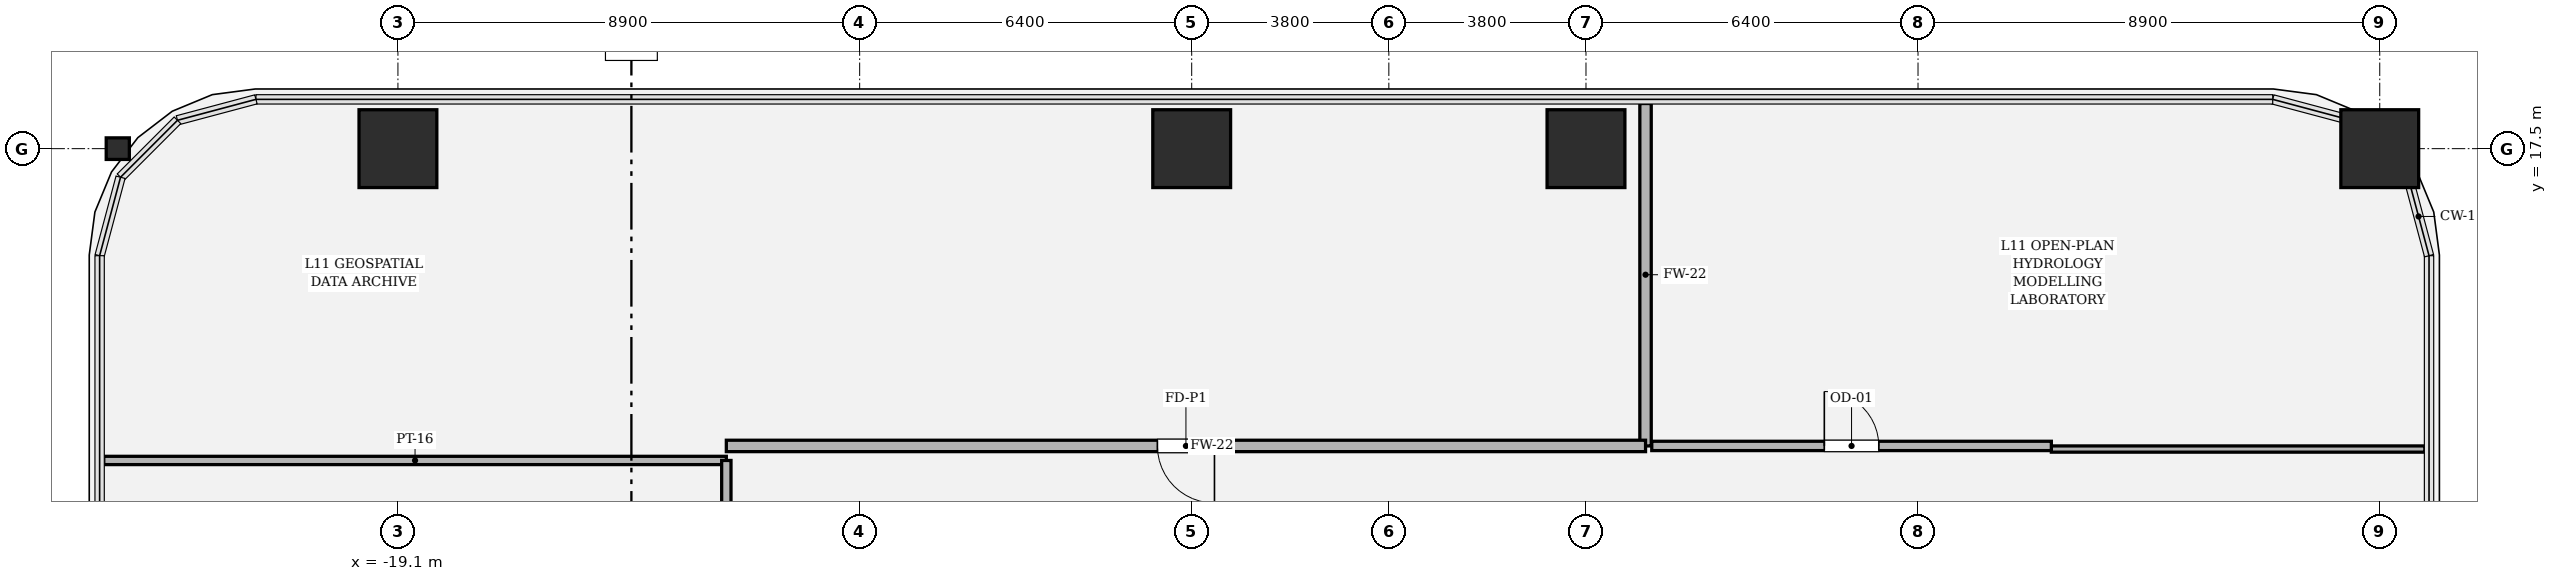
"""IFC4 building model, lengths in metres.
Left out: names, types, materials, properties, quantities, classifications, styles, units other than length and angle.
Written with IfcOpenShell. Run it as: python <this file> out.ifc"""

import sys

from ifc_helpers import new_model, si_unit, direction, frame, frame_2d, origin, origin_2d, place, context, subcontext, project, spatial, rectangle, hollow_rectangle, i_section, extrude, element, fill, save


model = new_model("IFC4")
c1 = context("Model", 3, precision=1e-05, world=origin(), true_north=direction((0.0, 1.0)))
c2 = subcontext(c1, "Body", "Model", "MODEL_VIEW")
j1 = project(units=[si_unit("LENGTHUNIT", "METRE"), si_unit("PLANEANGLEUNIT", "RADIAN")], contexts=[c1])
p1 = place(None, origin())
s1 = spatial("IfcSite", under=j1, at=p1, CompositionType="ELEMENT")
p2 = place(p1, origin())
s2 = spatial("IfcBuilding", under=s1, at=p2, CompositionType="ELEMENT")
p3 = place(p2, frame((0.0, 0.0, 52.5)))
s3 = spatial("IfcBuildingStorey", under=s2, at=p3, CompositionType="ELEMENT", Elevation=52.5)
for number, where, z_axis, x_axis in (
    (1, (19.1, 17.5, 0.0), (0.0, 0.0, 1.0), (1.0, 0.0, 0.0)),
    (2, (3.8, 17.5, 0.0), (0.0, 0.0, 1.0), (1.0, 0.0, 0.0)),
    (3, (-3.8, 17.5, 0.0), (0.0, 0.0, 1.0), (1.0, 0.0, 0.0)),
    (4, (-19.1, 17.5, 0.0), (0.0, 0.0, 1.0), (1.0, 0.0, 0.0)),
):
    element("IfcColumn", number, at=place(p3, frame(where, z_axis=z_axis, x_axis=x_axis)), inside=s3, PredefinedType="COLUMN", context=c2, shape_type="SweptSolid", body=[
        extrude(hollow_rectangle(XDim=1.5, YDim=1.5, WallThickness=0.045, at=origin_2d()), origin(), (0.0, 0.0, 1.0), 4.05),
    ])
p4 = place(p3, frame((-24.5, 17.5, 0.0), z_axis=(0.0, 0.0, 1.0), x_axis=(0.0, 1.0, 0.0)))
e5 = element("IfcColumn", 5, at=p4, inside=s3, PredefinedType="COLUMN", context=c2, shape_type="SweptSolid", body=[
    extrude(i_section(OverallWidth=0.416, OverallDepth=0.446, WebThickness=0.039, FlangeThickness=0.062, FilletRadius=0.018, at=origin_2d()), origin(), (0.0, 0.0, 1.0), 4.048),
])
p5 = place(p3, frame((-24.77, 11.49, 0.0), z_axis=(0.0, 0.0, 1.0), x_axis=(1.0, 0.0, 0.0)))
e6 = element("IfcWall", 6, at=p5, inside=s3, PredefinedType="PARTITIONING", context=c2, shape_type="SweptSolid", body=[
    extrude(rectangle(XDim=12.0, YDim=0.16, at=frame_2d((6.0, 0.0))), origin(), (0.0, 0.0, 1.0), 2.524),
])
p6 = place(p3, frame((-12.77, 11.49, 0.0), z_axis=(0.0, 0.0, 1.0), x_axis=(0.0, -1.0, 0.0)))
e7 = element("IfcWall", 7, at=p6, inside=s3, PredefinedType="PARTITIONING", context=c2, shape_type="SweptSolid", body=[
    extrude(rectangle(XDim=18.09, YDim=0.18, at=frame_2d((9.045, 0.0))), origin(), (0.0, 0.0, 1.0), 3.104),
])
p7 = place(p3, frame((4.948, 18.37, 0.0), z_axis=(0.0, 0.0, 1.0), x_axis=(0.0, -1.0, 0.0)))
e8 = element("IfcWall", 8, at=p7, inside=s3, PredefinedType="SOLIDWALL", context=c2, shape_type="SweptSolid", body=[
    extrude(rectangle(XDim=6.6, YDim=0.22, at=frame_2d((3.3, 0.0))), origin(), (0.0, 0.0, 1.0), 3.104),
])
p8 = place(p3, frame((4.948, 11.77, 0.0), z_axis=(0.0, 0.0, 1.0), x_axis=(-1.0, 0.0, 0.0)))
e9 = element("IfcWall", 9, at=p8, inside=s3, PredefinedType="SOLIDWALL", context=c2, shape_type="SweptSolid", body=[
    extrude(rectangle(XDim=17.718, YDim=0.22, at=frame_2d((8.859, 0.0))), origin(), (0.0, 0.0, 1.0), 3.104),
])
p9 = place(p8, frame((8.309, 0.0, 0.0)))
e10 = element("IfcOpeningElement", 10, at=p9, cuts=e9, PredefinedType="OPENING", context=c2, shape_type="SweptSolid", body=[
    extrude(rectangle(XDim=1.1, YDim=2.2, at=frame_2d((0.55, 1.1))), frame((0.0, 0.12, 0.0), z_axis=(0.0, -1.0, 0.0), x_axis=(1.0, 0.0, 0.0)), (0.0, 0.0, 1.0), 0.24),
])
p10 = place(p3, frame((19.97, 11.71, 0.0), z_axis=(0.0, 0.0, 1.0), x_axis=(-1.0, 0.0, 0.0)))
e11 = element("IfcWall", 11, at=p10, inside=s3, PredefinedType="PARTITIONING", context=c2, shape_type="SweptSolid", body=[
    extrude(rectangle(XDim=7.2, YDim=0.12, at=frame_2d((3.6, 0.0))), origin(), (0.0, 0.0, 1.0), 3.104),
])
p11 = place(p3, frame((12.77, 11.77, 0.0), z_axis=(0.0, 0.0, 1.0), x_axis=(-1.0, 0.0, 0.0)))
e12 = element("IfcWall", 12, at=p11, inside=s3, PredefinedType="PARTITIONING", context=c2, shape_type="SweptSolid", body=[
    extrude(rectangle(XDim=7.702, YDim=0.18, at=frame_2d((3.851, 0.0))), origin(), (0.0, 0.0, 1.0), 3.104),
])
p12 = place(p11, frame((3.326, 0.0, 0.0)))
e13 = element("IfcOpeningElement", 13, at=p12, cuts=e12, PredefinedType="OPENING", context=c2, shape_type="SweptSolid", body=[
    extrude(rectangle(XDim=1.05, YDim=2.2, at=frame_2d((0.525, 1.1))), frame((0.0, 0.1, 0.0), z_axis=(0.0, -1.0, 0.0), x_axis=(1.0, 0.0, 0.0)), (0.0, 0.0, 1.0), 0.2),
])
p13 = place(p9, origin())
e14 = element("IfcDoor", 14, at=p13, inside=s3, OperationType="SINGLE_SWING_LEFT", PredefinedType="DOOR", context=c2, shape_type="SweptSolid", body=[
    extrude(rectangle(XDim=1.1, YDim=2.2, at=frame_2d((0.55, 1.1))), frame((0.0, 0.025, 0.0), z_axis=(0.0, -1.0, 0.0), x_axis=(1.0, 0.0, 0.0)), (0.0, 0.0, 1.0), 0.05),
])
fill(e10, e14)
p14 = place(p12, origin())
e15 = element("IfcDoor", 15, at=p14, inside=s3, OperationType="SINGLE_SWING_RIGHT", PredefinedType="DOOR", context=c2, shape_type="SweptSolid", body=[
    extrude(rectangle(XDim=1.05, YDim=2.2, at=frame_2d((0.525, 1.1))), frame((0.0, 0.025, 0.0), z_axis=(0.0, -1.0, 0.0), x_axis=(1.0, 0.0, 0.0)), (0.0, 0.0, 1.0), 0.05),
])
fill(e13, e15)
save(model, sys.argv[1])
